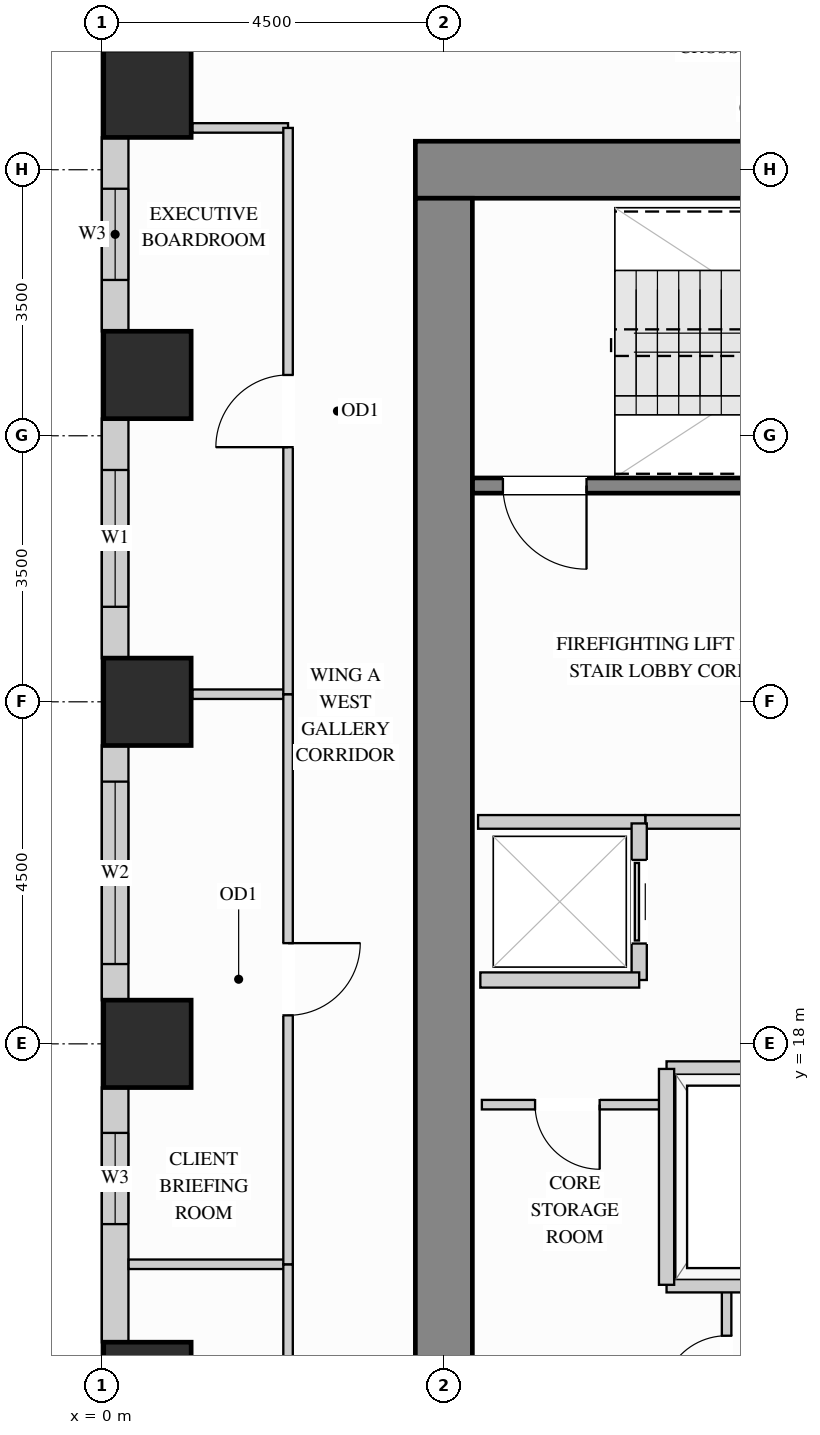
"""IFC4 building model, lengths in metres.
Left out: names, types, materials, properties, quantities, classifications, styles, units other than length and angle.
Written with IfcOpenShell. Run it as: python <this file> out.ifc"""

import sys

from ifc_helpers import new_model, si_unit, direction, frame, frame_2d, origin, origin_2d, place, context, subcontext, project, spatial, rectangle, extrude, source, transform, mapped, element, fill, save


model = new_model("IFC4")
c1 = context("Model", 3, precision=1e-05, world=origin(), true_north=direction((0.0, 1.0)))
c2 = subcontext(c1, "Body", "Model", "MODEL_VIEW")
j1 = project(units=[si_unit("LENGTHUNIT", "METRE"), si_unit("PLANEANGLEUNIT", "RADIAN")], contexts=[c1])
p1 = place(None, origin())
s1 = spatial("IfcSite", under=j1, at=p1, CompositionType="ELEMENT")
p2 = place(p1, origin())
s2 = spatial("IfcBuilding", under=s1, at=p2, CompositionType="ELEMENT")
p3 = place(p2, frame((0.0, 0.0, 106.2)))
s3 = spatial("IfcBuildingStorey", under=s2, at=p3, CompositionType="ELEMENT", Elevation=106.2)
m1 = source(origin(), c2, "Body", "SweptSolid", [
    extrude(rectangle(XDim=1.15, YDim=1.15, at=origin_2d()), origin(), (0.0, 0.0, 1.0), 3.38),
])
for number, where, z_axis, x_axis in (
    (1, (0.6, 13.5, 0.0), (0.0, 0.0, 1.0), (1.0, 0.0, 0.0)),
    (2, (0.6, 18.0, 0.0), (0.0, 0.0, 1.0), (1.0, 0.0, 0.0)),
    (3, (0.6, 22.5, 0.0), (0.0, 0.0, 1.0), (1.0, 0.0, 0.0)),
    (4, (0.6, 26.8, 0.0), (0.0, 0.0, 1.0), (1.0, 0.0, 0.0)),
    (5, (0.6, 30.5, 0.0), (0.0, 0.0, 1.0), (1.0, 0.0, 0.0)),
):
    element("IfcColumn", number, at=place(p3, frame(where, z_axis=z_axis, x_axis=x_axis)), inside=s3, PredefinedType="COLUMN", context=c2, shape_type="MappedRepresentation", body=[
        mapped(m1, transform((0.0, 0.0, 0.0), x_axis=(1.0, 0.0, 0.0), y_axis=(0.0, 1.0, 0.0), z_axis=(0.0, 0.0, 1.0))),
    ])
m2 = source(origin(), c2, "Body", "SweptSolid", [
    extrude(rectangle(XDim=10.75, YDim=0.75, at=frame_2d((5.375, 0.0))), origin(), (0.0, 0.0, 1.0), 3.38),
])
p4 = place(p3, frame((4.125, 29.5, 0.0), z_axis=(0.0, 0.0, 1.0), x_axis=(1.0, 0.0, 0.0)))
e6 = element("IfcWall", 6, at=p4, inside=s3, PredefinedType="SHEAR", context=c2, shape_type="MappedRepresentation", body=[
    mapped(m2, transform((0.0, 0.0, 0.0), x_axis=(1.0, 0.0, 0.0), y_axis=(0.0, 1.0, 0.0), z_axis=(0.0, 0.0, 1.0))),
])
m3 = source(origin(), c2, "Body", "SweptSolid", [
    extrude(rectangle(XDim=20.25, YDim=0.75, at=frame_2d((10.125, 0.0))), origin(), (0.0, 0.0, 1.0), 3.38),
])
p5 = place(p3, frame((4.5, 8.875, 0.0), z_axis=(0.0, 0.0, 1.0), x_axis=(0.0, 1.0, 0.0)))
e7 = element("IfcWall", 7, at=p5, inside=s3, PredefinedType="SHEAR", context=c2, shape_type="MappedRepresentation", body=[
    mapped(m3, transform((0.0, 0.0, 0.0), x_axis=(1.0, 0.0, 0.0), y_axis=(0.0, 1.0, 0.0), z_axis=(0.0, 0.0, 1.0))),
])
p6 = place(p3, frame((0.175, 29.927, 0.0), z_axis=(0.0, 0.0, 1.0), x_axis=(0.0, -1.0, 0.0)))
e8 = element("IfcWall", 8, at=p6, inside=s3, PredefinedType="SOLIDWALL", context=c2, shape_type="SweptSolid", body=[
    extrude(rectangle(XDim=2.554, YDim=0.35, at=frame_2d((1.277, 0.0))), origin(), (0.0, 0.0, 1.0), 3.365),
])
p7 = place(p6, frame((0.677, 0.0, 0.78)))
e9 = element("IfcOpeningElement", 9, at=p7, cuts=e8, PredefinedType="OPENING", context=c2, shape_type="SweptSolid", body=[
    extrude(rectangle(XDim=1.2, YDim=2.1, at=frame_2d((0.6, 1.05))), frame((0.0, 0.185, 0.0), z_axis=(0.0, -1.0, 0.0), x_axis=(1.0, 0.0, 0.0)), (0.0, 0.0, 1.0), 0.37),
])
p8 = place(p3, frame((0.175, 26.227, 0.0), z_axis=(0.0, 0.0, 1.0), x_axis=(0.0, -1.0, 0.0)))
e10 = element("IfcWall", 10, at=p8, inside=s3, PredefinedType="SOLIDWALL", context=c2, shape_type="SweptSolid", body=[
    extrude(rectangle(XDim=3.154, YDim=0.35, at=frame_2d((1.577, 0.0))), origin(), (0.0, 0.0, 1.0), 3.365),
])
p9 = place(p8, frame((0.677, 0.0, 0.78)))
e11 = element("IfcOpeningElement", 11, at=p9, cuts=e10, PredefinedType="OPENING", context=c2, shape_type="SweptSolid", body=[
    extrude(rectangle(XDim=1.8, YDim=2.1, at=frame_2d((0.9, 1.05))), frame((0.0, 0.185, 0.0), z_axis=(0.0, -1.0, 0.0), x_axis=(1.0, 0.0, 0.0)), (0.0, 0.0, 1.0), 0.37),
])
p10 = place(p3, frame((0.175, 21.927, 0.0), z_axis=(0.0, 0.0, 1.0), x_axis=(0.0, -1.0, 0.0)))
e12 = element("IfcWall", 12, at=p10, inside=s3, PredefinedType="SOLIDWALL", context=c2, shape_type="SweptSolid", body=[
    extrude(rectangle(XDim=3.354, YDim=0.35, at=frame_2d((1.677, 0.0))), origin(), (0.0, 0.0, 1.0), 3.365),
])
p11 = place(p10, frame((0.477, 0.0, 0.78)))
e13 = element("IfcOpeningElement", 13, at=p11, cuts=e12, PredefinedType="OPENING", context=c2, shape_type="SweptSolid", body=[
    extrude(rectangle(XDim=2.4, YDim=2.1, at=frame_2d((1.2, 1.05))), frame((0.0, 0.185, 0.0), z_axis=(0.0, -1.0, 0.0), x_axis=(1.0, 0.0, 0.0)), (0.0, 0.0, 1.0), 0.37),
])
p12 = place(p3, frame((0.175, 17.427, 0.0), z_axis=(0.0, 0.0, 1.0), x_axis=(0.0, -1.0, 0.0)))
e14 = element("IfcWall", 14, at=p12, inside=s3, PredefinedType="SOLIDWALL", context=c2, shape_type="SweptSolid", body=[
    extrude(rectangle(XDim=3.354, YDim=0.35, at=frame_2d((1.677, 0.0))), origin(), (0.0, 0.0, 1.0), 3.365),
])
p13 = place(p12, frame((0.598, 0.0, 0.78)))
e15 = element("IfcOpeningElement", 15, at=p13, cuts=e14, PredefinedType="OPENING", context=c2, shape_type="SweptSolid", body=[
    extrude(rectangle(XDim=1.2, YDim=2.1, at=frame_2d((0.6, 1.05))), frame((0.0, 0.185, 0.0), z_axis=(0.0, -1.0, 0.0), x_axis=(1.0, 0.0, 0.0)), (0.0, 0.0, 1.0), 0.37),
])
p14 = place(p3, frame((7.15, 20.92, 0.0), z_axis=(0.0, 0.0, 1.0), x_axis=(1.0, 0.0, 0.0)))
e16 = element("IfcWall", 16, at=p14, inside=s3, PredefinedType="PARTITIONING", context=c2, shape_type="SweptSolid", body=[
    extrude(rectangle(XDim=4.68, YDim=0.18, at=frame_2d((2.34, 0.0))), origin(), (0.0, 0.0, 1.0), 3.365),
])
p15 = place(p14, frame((2.2, 0.0, 0.0)))
e17 = element("IfcOpeningElement", 17, at=p15, cuts=e16, PredefinedType="OPENING", context=c2, shape_type="SweptSolid", body=[
    extrude(rectangle(XDim=1.1, YDim=2.15, at=frame_2d((0.55, 1.075))), frame((0.0, 0.1, 0.0), z_axis=(0.0, -1.0, 0.0), x_axis=(1.0, 0.0, 0.0)), (0.0, 0.0, 1.0), 0.2),
])
m4 = source(origin(), c2, "Body", "SweptSolid", [
    extrude(rectangle(XDim=2.2, YDim=0.18, at=frame_2d((1.1, 0.0))), origin(), (0.0, 0.0, 1.0), 3.365),
])
p16 = place(p3, frame((4.95, 20.92, 0.0), z_axis=(0.0, 0.0, 1.0), x_axis=(1.0, 0.0, 0.0)))
e18 = element("IfcWall", 18, at=p16, inside=s3, PredefinedType="PARTITIONING", context=c2, shape_type="MappedRepresentation", body=[
    mapped(m4, transform((0.0, 0.0, 0.0), x_axis=(1.0, 0.0, 0.0), y_axis=(0.0, 1.0, 0.0), z_axis=(0.0, 0.0, 1.0))),
])
p17 = place(p3, frame((8.22, 12.75, 0.0), z_axis=(0.0, 0.0, 1.0), x_axis=(0.0, 1.0, 0.0)))
e19 = element("IfcWall", 19, at=p17, inside=s3, PredefinedType="PARTITIONING", context=c2, shape_type="SweptSolid", body=[
    extrude(rectangle(XDim=2.07, YDim=0.125, at=frame_2d((1.035, 0.0))), origin(), (0.0, 0.0, 1.0), 3.365),
])
p18 = place(p17, frame((0.56, 0.0, 0.0)))
e20 = element("IfcOpeningElement", 20, at=p18, cuts=e19, PredefinedType="OPENING", context=c2, shape_type="SweptSolid", body=[
    extrude(rectangle(XDim=0.85, YDim=2.1, at=frame_2d((0.425, 1.05))), frame((0.0, 0.073, 0.0), z_axis=(0.0, -1.0, 0.0), x_axis=(1.0, 0.0, 0.0)), (0.0, 0.0, 1.0), 0.145),
])
p19 = place(p3, frame((5.0, 17.2, 0.0), z_axis=(0.0, 0.0, 1.0), x_axis=(1.0, 0.0, 0.0)))
e21 = element("IfcWall", 21, at=p19, inside=s3, PredefinedType="PARTITIONING", context=c2, shape_type="SweptSolid", body=[
    extrude(rectangle(XDim=2.4, YDim=0.125, at=frame_2d((1.2, 0.0))), origin(), (0.0, 0.0, 1.0), 3.365),
])
p20 = place(p19, frame((0.7, 0.0, 0.0)))
e22 = element("IfcOpeningElement", 22, at=p20, cuts=e21, PredefinedType="OPENING", context=c2, shape_type="SweptSolid", body=[
    extrude(rectangle(XDim=0.85, YDim=2.1, at=frame_2d((0.425, 1.05))), frame((0.0, 0.073, 0.0), z_axis=(0.0, -1.0, 0.0), x_axis=(1.0, 0.0, 0.0)), (0.0, 0.0, 1.0), 0.145),
])
m5 = source(origin(), c2, "Body", "SweptSolid", [
    extrude(rectangle(XDim=1.26, YDim=0.125, at=frame_2d((0.63, 0.0))), origin(), (0.0, 0.0, 1.0), 3.365),
])
p21 = place(p3, frame((1.19, 30.05, 0.0), z_axis=(0.0, 0.0, 1.0), x_axis=(1.0, 0.0, 0.0)))
e23 = element("IfcWall", 23, at=p21, inside=s3, PredefinedType="PARTITIONING", context=c2, shape_type="MappedRepresentation", body=[
    mapped(m5, transform((0.0, 0.0, 0.0), x_axis=(1.0, 0.0, 0.0), y_axis=(0.0, 1.0, 0.0), z_axis=(0.0, 0.0, 1.0))),
])
m6 = source(origin(), c2, "Body", "SweptSolid", [
    extrude(rectangle(XDim=2.098, YDim=0.125, at=frame_2d((1.049, 0.0))), origin(), (0.0, 0.0, 1.0), 3.365),
])
p22 = place(p3, frame((0.352, 15.1, 0.0), z_axis=(0.0, 0.0, 1.0), x_axis=(1.0, 0.0, 0.0)))
e24 = element("IfcWall", 24, at=p22, inside=s3, PredefinedType="PARTITIONING", context=c2, shape_type="MappedRepresentation", body=[
    mapped(m6, transform((0.0, 0.0, 0.0), x_axis=(1.0, 0.0, 0.0), y_axis=(0.0, 1.0, 0.0), z_axis=(0.0, 0.0, 1.0))),
])
p23 = place(p3, frame((1.19, 22.6, 0.0), z_axis=(0.0, 0.0, 1.0), x_axis=(1.0, 0.0, 0.0)))
e25 = element("IfcWall", 25, at=p23, inside=s3, PredefinedType="PARTITIONING", context=c2, shape_type="MappedRepresentation", body=[
    mapped(m5, transform((0.0, 0.0, 0.0), x_axis=(1.0, 0.0, 0.0), y_axis=(0.0, 1.0, 0.0), z_axis=(0.0, 0.0, 1.0))),
])
p24 = place(p3, frame((2.45, 7.85, 0.0), z_axis=(0.0, 0.0, 1.0), x_axis=(0.0, 1.0, 0.0)))
e26 = element("IfcWall", 26, at=p24, inside=s3, PredefinedType="PARTITIONING", context=c2, shape_type="SweptSolid", body=[
    extrude(rectangle(XDim=7.25, YDim=0.125, at=frame_2d((3.625, 0.0))), origin(), (0.0, 0.0, 1.0), 3.365),
])
p25 = place(p24, frame((3.15, 0.0, 0.0)))
e27 = element("IfcOpeningElement", 27, at=p25, cuts=e26, PredefinedType="OPENING", context=c2, shape_type="SweptSolid", body=[
    extrude(rectangle(XDim=0.95, YDim=2.15, at=frame_2d((0.475, 1.075))), frame((0.0, 0.073, 0.0), z_axis=(0.0, -1.0, 0.0), x_axis=(1.0, 0.0, 0.0)), (0.0, 0.0, 1.0), 0.145),
])
p26 = place(p3, frame((2.45, 15.1, 0.0), z_axis=(0.0, 0.0, 1.0), x_axis=(0.0, 1.0, 0.0)))
e28 = element("IfcWall", 28, at=p26, inside=s3, PredefinedType="PARTITIONING", context=c2, shape_type="SweptSolid", body=[
    extrude(rectangle(XDim=7.5, YDim=0.125, at=frame_2d((3.75, 0.0))), origin(), (0.0, 0.0, 1.0), 3.365),
])
p27 = place(p26, frame((3.275, 0.0, 0.0)))
e29 = element("IfcOpeningElement", 29, at=p27, cuts=e28, PredefinedType="OPENING", context=c2, shape_type="SweptSolid", body=[
    extrude(rectangle(XDim=0.95, YDim=2.15, at=frame_2d((0.475, 1.075))), frame((0.0, 0.073, 0.0), z_axis=(0.0, -1.0, 0.0), x_axis=(1.0, 0.0, 0.0)), (0.0, 0.0, 1.0), 0.145),
])
p28 = place(p3, frame((2.45, 22.6, 0.0), z_axis=(0.0, 0.0, 1.0), x_axis=(0.0, 1.0, 0.0)))
e30 = element("IfcWall", 30, at=p28, inside=s3, PredefinedType="PARTITIONING", context=c2, shape_type="SweptSolid", body=[
    extrude(rectangle(XDim=7.45, YDim=0.125, at=frame_2d((3.725, 0.0))), origin(), (0.0, 0.0, 1.0), 3.365),
])
p29 = place(p28, frame((3.25, 0.0, 0.0)))
e31 = element("IfcOpeningElement", 31, at=p29, cuts=e30, PredefinedType="OPENING", context=c2, shape_type="SweptSolid", body=[
    extrude(rectangle(XDim=0.95, YDim=2.15, at=frame_2d((0.475, 1.075))), frame((0.0, 0.073, 0.0), z_axis=(0.0, -1.0, 0.0), x_axis=(1.0, 0.0, 0.0)), (0.0, 0.0, 1.0), 0.145),
])
p30 = place(p3, frame((7.07, 18.84, 0.0), z_axis=(0.0, 0.0, 1.0), x_axis=(0.0, 1.0, 0.0)))
e32 = element("IfcWall", 32, at=p30, inside=s3, PredefinedType="PARTITIONING", context=c2, shape_type="SweptSolid", body=[
    extrude(rectangle(XDim=2.06, YDim=0.2, at=frame_2d((1.03, 0.0))), origin(), (0.0, 0.0, 1.0), 3.365),
])
p31 = place(p30, frame((0.48, 0.0, 0.0)))
e33 = element("IfcOpeningElement", 33, at=p31, cuts=e32, PredefinedType="OPENING", context=c2, shape_type="SweptSolid", body=[
    extrude(rectangle(XDim=1.1, YDim=2.2, at=frame_2d((0.55, 1.1))), frame((0.0, 0.11, 0.0), z_axis=(0.0, -1.0, 0.0), x_axis=(1.0, 0.0, 0.0)), (0.0, 0.0, 1.0), 0.22),
])
m7 = source(origin(), c2, "Body", "SweptSolid", [
    extrude(rectangle(XDim=2.09, YDim=0.2, at=frame_2d((1.045, 0.0))), origin(), (0.0, 0.0, 1.0), 3.365),
])
p32 = place(p3, frame((4.98, 18.84, 0.0), z_axis=(0.0, 0.0, 1.0), x_axis=(1.0, 0.0, 0.0)))
e34 = element("IfcWall", 34, at=p32, inside=s3, PredefinedType="PARTITIONING", context=c2, shape_type="MappedRepresentation", body=[
    mapped(m7, transform((0.0, 0.0, 0.0), x_axis=(1.0, 0.0, 0.0), y_axis=(0.0, 1.0, 0.0), z_axis=(0.0, 0.0, 1.0))),
])
m8 = source(origin(), c2, "Body", "SweptSolid", [
    extrude(rectangle(XDim=2.04, YDim=0.2, at=frame_2d((1.02, 0.0))), origin(), (0.0, 0.0, 1.0), 3.365),
])
for number, where, z_axis, x_axis in (
    (35, (7.43, 17.67, 0.0), (0.0, 0.0, 1.0), (1.0, 0.0, 0.0)),
    (36, (7.43, 14.83, 0.0), (0.0, 0.0, 1.0), (1.0, 0.0, 0.0)),
):
    element("IfcWall", number, at=place(p3, frame(where, z_axis=z_axis, x_axis=x_axis)), inside=s3, PredefinedType="PARTITIONING", context=c2, shape_type="MappedRepresentation", body=[
        mapped(m8, transform((0.0, 0.0, 0.0), x_axis=(1.0, 0.0, 0.0), y_axis=(0.0, 1.0, 0.0), z_axis=(0.0, 0.0, 1.0))),
    ])
m9 = source(origin(), c2, "Body", "SweptSolid", [
    extrude(rectangle(XDim=2.84, YDim=0.2, at=frame_2d((1.42, 0.0))), origin(), (0.0, 0.0, 1.0), 3.365),
])
p33 = place(p3, frame((7.43, 14.83, 0.0), z_axis=(0.0, 0.0, 1.0), x_axis=(0.0, 1.0, 0.0)))
e37 = element("IfcWall", 37, at=p33, inside=s3, PredefinedType="PARTITIONING", context=c2, shape_type="MappedRepresentation", body=[
    mapped(m9, transform((0.0, 0.0, 0.0), x_axis=(1.0, 0.0, 0.0), y_axis=(0.0, 1.0, 0.0), z_axis=(0.0, 0.0, 1.0))),
])
p34 = place(p3, frame((4.877, 25.345, 0.0), z_axis=(0.0, 0.0, 1.0), x_axis=(1.0, 0.0, 0.0)))
e38 = element("IfcWall", 38, at=p34, inside=s3, PredefinedType="SHEAR", context=c2, shape_type="SweptSolid", body=[
    extrude(rectangle(XDim=7.528, YDim=0.2, at=frame_2d((3.764, 0.0))), origin(), (0.0, 0.0, 1.0), 3.38),
])
p35 = place(p34, frame((0.4, 0.0, 0.0)))
e39 = element("IfcOpeningElement", 39, at=p35, cuts=e38, PredefinedType="OPENING", context=c2, shape_type="SweptSolid", body=[
    extrude(rectangle(XDim=1.1, YDim=2.15, at=frame_2d((0.55, 1.075))), frame((0.0, 0.11, 0.0), z_axis=(0.0, -1.0, 0.0), x_axis=(1.0, 0.0, 0.0)), (0.0, 0.0, 1.0), 0.22),
])
m10 = source(origin(), c2, "Body", "SweptSolid", [
    extrude(rectangle(XDim=1.1, YDim=2.2, at=frame_2d((0.55, 1.1))), frame((0.0, 0.025, 0.0), z_axis=(0.0, -1.0, 0.0), x_axis=(1.0, 0.0, 0.0)), (0.0, 0.0, 1.0), 0.05),
])
p36 = place(p31, origin())
e40 = element("IfcDoor", 40, at=p36, inside=s3, OperationType="SLIDING_TO_LEFT", PredefinedType="DOOR", context=c2, shape_type="MappedRepresentation", body=[
    mapped(m10, transform((0.0, 0.0, 0.0), x_axis=(1.0, 0.0, 0.0), y_axis=(0.0, 1.0, 0.0), z_axis=(0.0, 0.0, 1.0))),
])
fill(e33, e40)
m11 = source(origin(), c2, "Body", "SweptSolid", [
    extrude(rectangle(XDim=0.95, YDim=2.15, at=frame_2d((0.475, 1.075))), frame((0.0, 0.025, 0.0), z_axis=(0.0, -1.0, 0.0), x_axis=(1.0, 0.0, 0.0)), (0.0, 0.0, 1.0), 0.05),
])
p37 = place(p27, origin())
e41 = element("IfcDoor", 41, at=p37, inside=s3, OperationType="SINGLE_SWING_RIGHT", PredefinedType="DOOR", context=c2, shape_type="MappedRepresentation", body=[
    mapped(m11, transform((0.0, 0.0, 0.0), x_axis=(1.0, 0.0, 0.0), y_axis=(0.0, 1.0, 0.0), z_axis=(0.0, 0.0, 1.0))),
])
fill(e29, e41)
p38 = place(p29, origin())
e42 = element("IfcDoor", 42, at=p38, inside=s3, OperationType="SINGLE_SWING_LEFT", PredefinedType="DOOR", context=c2, shape_type="MappedRepresentation", body=[
    mapped(m11, transform((0.0, 0.0, 0.0), x_axis=(1.0, 0.0, 0.0), y_axis=(0.0, 1.0, 0.0), z_axis=(0.0, 0.0, 1.0))),
])
fill(e31, e42)
m12 = source(origin(), c2, "Body", "SweptSolid", [
    extrude(rectangle(XDim=0.85, YDim=2.1, at=frame_2d((0.425, 1.05))), frame((0.0, 0.025, 0.0), z_axis=(0.0, -1.0, 0.0), x_axis=(1.0, 0.0, 0.0)), (0.0, 0.0, 1.0), 0.05),
])
p39 = place(p20, origin())
e43 = element("IfcDoor", 43, at=p39, inside=s3, OperationType="SINGLE_SWING_RIGHT", PredefinedType="DOOR", context=c2, shape_type="MappedRepresentation", body=[
    mapped(m12, transform((0.0, 0.0, 0.0), x_axis=(1.0, 0.0, 0.0), y_axis=(0.0, 1.0, 0.0), z_axis=(0.0, 0.0, 1.0))),
])
fill(e22, e43)
p40 = place(p18, origin())
e44 = element("IfcDoor", 44, at=p40, inside=s3, OperationType="SINGLE_SWING_LEFT", PredefinedType="DOOR", context=c2, shape_type="MappedRepresentation", body=[
    mapped(m12, transform((0.0, 0.0, 0.0), x_axis=(1.0, 0.0, 0.0), y_axis=(0.0, 1.0, 0.0), z_axis=(0.0, 0.0, 1.0))),
])
fill(e20, e44)
m13 = source(origin(), c2, "Body", "SweptSolid", [
    extrude(rectangle(XDim=1.1, YDim=2.15, at=frame_2d((0.55, 1.075))), frame((0.0, 0.025, 0.0), z_axis=(0.0, -1.0, 0.0), x_axis=(1.0, 0.0, 0.0)), (0.0, 0.0, 1.0), 0.05),
])
p41 = place(p35, origin())
e45 = element("IfcDoor", 45, at=p41, inside=s3, OperationType="SINGLE_SWING_RIGHT", PredefinedType="DOOR", context=c2, shape_type="MappedRepresentation", body=[
    mapped(m13, transform((0.0, 0.0, 0.0), x_axis=(1.0, 0.0, 0.0), y_axis=(0.0, 1.0, 0.0), z_axis=(0.0, 0.0, 1.0))),
])
fill(e39, e45)
m14 = source(origin(), c2, "Body", "SweptSolid", [
    extrude(rectangle(XDim=1.8, YDim=2.1, at=frame_2d((0.9, 1.05))), frame((0.0, 0.03, 0.0), z_axis=(0.0, -1.0, 0.0), x_axis=(1.0, 0.0, 0.0)), (0.0, 0.0, 1.0), 0.06),
])
p42 = place(p9, origin())
e46 = element("IfcWindow", 46, at=p42, inside=s3, PartitioningType="SINGLE_PANEL", PredefinedType="WINDOW", context=c2, shape_type="MappedRepresentation", body=[
    mapped(m14, transform((0.0, 0.0, 0.0), x_axis=(1.0, 0.0, 0.0), y_axis=(0.0, 1.0, 0.0), z_axis=(0.0, 0.0, 1.0))),
])
fill(e11, e46)
m15 = source(origin(), c2, "Body", "SweptSolid", [
    extrude(rectangle(XDim=2.4, YDim=2.1, at=frame_2d((1.2, 1.05))), frame((0.0, 0.03, 0.0), z_axis=(0.0, -1.0, 0.0), x_axis=(1.0, 0.0, 0.0)), (0.0, 0.0, 1.0), 0.06),
])
p43 = place(p11, origin())
e47 = element("IfcWindow", 47, at=p43, inside=s3, PartitioningType="SINGLE_PANEL", PredefinedType="WINDOW", context=c2, shape_type="MappedRepresentation", body=[
    mapped(m15, transform((0.0, 0.0, 0.0), x_axis=(1.0, 0.0, 0.0), y_axis=(0.0, 1.0, 0.0), z_axis=(0.0, 0.0, 1.0))),
])
fill(e13, e47)
m16 = source(origin(), c2, "Body", "SweptSolid", [
    extrude(rectangle(XDim=1.2, YDim=2.1, at=frame_2d((0.6, 1.05))), frame((0.0, 0.03, 0.0), z_axis=(0.0, -1.0, 0.0), x_axis=(1.0, 0.0, 0.0)), (0.0, 0.0, 1.0), 0.06),
])
p44 = place(p7, origin())
e48 = element("IfcWindow", 48, at=p44, inside=s3, PartitioningType="SINGLE_PANEL", PredefinedType="WINDOW", context=c2, shape_type="MappedRepresentation", body=[
    mapped(m16, transform((0.0, 0.0, 0.0), x_axis=(1.0, 0.0, 0.0), y_axis=(0.0, 1.0, 0.0), z_axis=(0.0, 0.0, 1.0))),
])
fill(e9, e48)
p45 = place(p13, origin())
e49 = element("IfcWindow", 49, at=p45, inside=s3, PartitioningType="SINGLE_PANEL", PredefinedType="WINDOW", context=c2, shape_type="MappedRepresentation", body=[
    mapped(m16, transform((0.0, 0.0, 0.0), x_axis=(1.0, 0.0, 0.0), y_axis=(0.0, 1.0, 0.0), z_axis=(0.0, 0.0, 1.0))),
])
fill(e15, e49)
save(model, sys.argv[1])
